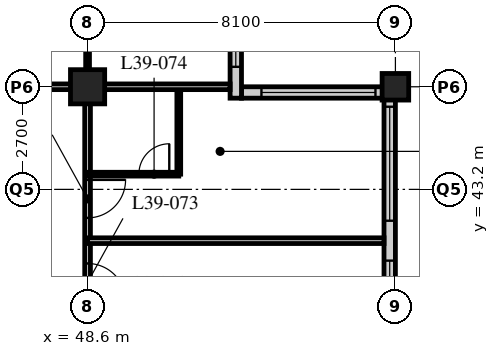
"""IFC4 building model, lengths in metres.
Left out: names, types, materials, properties, quantities, classifications, styles, units other than length and angle.
Written with IfcOpenShell. Run it as: python <this file> out.ifc"""

import sys

from ifc_helpers import new_model, si_unit, direction, frame, frame_2d, origin, origin_2d, place, context, subcontext, project, spatial, rectangle, hollow_rectangle, extrude, element, fill, save


model = new_model("IFC4")
c1 = context("Model", 3, precision=1e-05, world=origin(), true_north=direction((0.0, 1.0)))
c2 = subcontext(c1, "Body", "Model", "MODEL_VIEW")
j1 = project(units=[si_unit("LENGTHUNIT", "METRE"), si_unit("PLANEANGLEUNIT", "RADIAN")], contexts=[c1])
p1 = place(None, origin())
s1 = spatial("IfcSite", under=j1, at=p1, CompositionType="ELEMENT")
p2 = place(p1, origin())
s2 = spatial("IfcBuilding", under=s1, at=p2, CompositionType="ELEMENT")
p3 = place(p2, frame((0.0, 0.0, 151.0)))
s3 = spatial("IfcBuildingStorey", under=s2, at=p3, CompositionType="ELEMENT", Elevation=151.0)
p4 = place(p3, frame((48.6, 45.9, 0.0), z_axis=(0.0, 0.0, 1.0), x_axis=(1.0, 0.0, 0.0)))
e1 = element("IfcColumn", 1, at=p4, inside=s3, PredefinedType="COLUMN", context=c2, shape_type="SweptSolid", body=[
    extrude(hollow_rectangle(XDim=0.9, YDim=0.9, WallThickness=0.1, at=origin_2d()), origin(), (0.0, 0.0, 1.0), 3.4),
])
p5 = place(p3, frame((56.7, 45.9, 0.0), z_axis=(0.0, 0.0, 1.0), x_axis=(1.0, 0.0, 0.0)))
e2 = element("IfcColumn", 2, at=p5, inside=s3, PredefinedType="COLUMN", context=c2, shape_type="SweptSolid", body=[
    extrude(hollow_rectangle(XDim=0.7, YDim=0.7, WallThickness=0.07, at=origin_2d()), origin(), (0.0, 0.0, 1.0), 3.4),
])
p6 = place(p3, frame((56.55, 13.8, 0.0), z_axis=(0.0, 0.0, 1.0), x_axis=(0.0, 1.0, 0.0)))
e3 = element("IfcWall", 3, at=p6, inside=s3, PredefinedType="SOLIDWALL", context=c2, shape_type="SweptSolid", body=[
    extrude(rectangle(XDim=32.1, YDim=0.3, at=frame_2d((16.05, 0.0))), origin(), (0.0, 0.0, 1.0), 3.19),
])
p7 = place(p6, frame((0.225, 0.0, 0.9)))
e4 = element("IfcOpeningElement", 4, at=p7, cuts=e3, PredefinedType="OPENING", context=c2, shape_type="SweptSolid", body=[
    extrude(rectangle(XDim=3.0, YDim=1.4, at=frame_2d((1.5, 0.7))), frame((0.0, 0.16, 0.0), z_axis=(0.0, -1.0, 0.0), x_axis=(1.0, 0.0, 0.0)), (0.0, 0.0, 1.0), 0.32),
])
p8 = place(p6, frame((4.275, 0.0, 0.9)))
e5 = element("IfcOpeningElement", 5, at=p8, cuts=e3, PredefinedType="OPENING", context=c2, shape_type="SweptSolid", body=[
    extrude(rectangle(XDim=3.0, YDim=1.4, at=frame_2d((1.5, 0.7))), frame((0.0, 0.16, 0.0), z_axis=(0.0, -1.0, 0.0), x_axis=(1.0, 0.0, 0.0)), (0.0, 0.0, 1.0), 0.32),
])
p9 = place(p6, frame((8.325, 0.0, 0.9)))
e6 = element("IfcOpeningElement", 6, at=p9, cuts=e3, PredefinedType="OPENING", context=c2, shape_type="SweptSolid", body=[
    extrude(rectangle(XDim=3.0, YDim=1.4, at=frame_2d((1.5, 0.7))), frame((0.0, 0.16, 0.0), z_axis=(0.0, -1.0, 0.0), x_axis=(1.0, 0.0, 0.0)), (0.0, 0.0, 1.0), 0.32),
])
p10 = place(p6, frame((12.375, 0.0, 0.9)))
e7 = element("IfcOpeningElement", 7, at=p10, cuts=e3, PredefinedType="OPENING", context=c2, shape_type="SweptSolid", body=[
    extrude(rectangle(XDim=3.0, YDim=1.4, at=frame_2d((1.5, 0.7))), frame((0.0, 0.16, 0.0), z_axis=(0.0, -1.0, 0.0), x_axis=(1.0, 0.0, 0.0)), (0.0, 0.0, 1.0), 0.32),
])
p11 = place(p6, frame((16.425, 0.0, 0.9)))
e8 = element("IfcOpeningElement", 8, at=p11, cuts=e3, PredefinedType="OPENING", context=c2, shape_type="SweptSolid", body=[
    extrude(rectangle(XDim=3.0, YDim=1.4, at=frame_2d((1.5, 0.7))), frame((0.0, 0.16, 0.0), z_axis=(0.0, -1.0, 0.0), x_axis=(1.0, 0.0, 0.0)), (0.0, 0.0, 1.0), 0.32),
])
p12 = place(p6, frame((20.475, 0.0, 0.9)))
e9 = element("IfcOpeningElement", 9, at=p12, cuts=e3, PredefinedType="OPENING", context=c2, shape_type="SweptSolid", body=[
    extrude(rectangle(XDim=3.0, YDim=1.4, at=frame_2d((1.5, 0.7))), frame((0.0, 0.16, 0.0), z_axis=(0.0, -1.0, 0.0), x_axis=(1.0, 0.0, 0.0)), (0.0, 0.0, 1.0), 0.32),
])
p13 = place(p6, frame((24.525, 0.0, 0.9)))
e10 = element("IfcOpeningElement", 10, at=p13, cuts=e3, PredefinedType="OPENING", context=c2, shape_type="SweptSolid", body=[
    extrude(rectangle(XDim=3.0, YDim=1.4, at=frame_2d((1.5, 0.7))), frame((0.0, 0.16, 0.0), z_axis=(0.0, -1.0, 0.0), x_axis=(1.0, 0.0, 0.0)), (0.0, 0.0, 1.0), 0.32),
])
p14 = place(p6, frame((28.575, 0.0, 0.9)))
e11 = element("IfcOpeningElement", 11, at=p14, cuts=e3, PredefinedType="OPENING", context=c2, shape_type="SweptSolid", body=[
    extrude(rectangle(XDim=3.0, YDim=1.4, at=frame_2d((1.5, 0.7))), frame((0.0, 0.16, 0.0), z_axis=(0.0, -1.0, 0.0), x_axis=(1.0, 0.0, 0.0)), (0.0, 0.0, 1.0), 0.32),
])
p15 = place(p3, frame((56.4, 45.75, 0.0), z_axis=(0.0, 0.0, 1.0), x_axis=(-1.0, 0.0, 0.0)))
e12 = element("IfcWall", 12, at=p15, inside=s3, PredefinedType="SOLIDWALL", context=c2, shape_type="SweptSolid", body=[
    extrude(rectangle(XDim=3.75, YDim=0.3, at=frame_2d((1.875, 0.0))), origin(), (0.0, 0.0, 1.0), 3.19),
])
p16 = place(p15, frame((0.225, 0.0, 0.9)))
e13 = element("IfcOpeningElement", 13, at=p16, cuts=e12, PredefinedType="OPENING", context=c2, shape_type="SweptSolid", body=[
    extrude(rectangle(XDim=3.0, YDim=1.4, at=frame_2d((1.5, 0.7))), frame((0.0, 0.16, 0.0), z_axis=(0.0, -1.0, 0.0), x_axis=(1.0, 0.0, 0.0)), (0.0, 0.0, 1.0), 0.32),
])
p17 = place(p3, frame((52.5, 45.6, 0.0), z_axis=(0.0, 0.0, 1.0), x_axis=(0.0, 1.0, 0.0)))
e14 = element("IfcWall", 14, at=p17, inside=s3, PredefinedType="SOLIDWALL", context=c2, shape_type="SweptSolid", body=[
    extrude(rectangle(XDim=4.35, YDim=0.3, at=frame_2d((2.175, 0.0))), origin(), (0.0, 0.0, 1.0), 3.19),
])
p18 = place(p17, frame((0.825, 0.0, 0.9)))
e15 = element("IfcOpeningElement", 15, at=p18, cuts=e14, PredefinedType="OPENING", context=c2, shape_type="SweptSolid", body=[
    extrude(rectangle(XDim=3.0, YDim=1.4, at=frame_2d((1.5, 0.7))), frame((0.0, 0.16, 0.0), z_axis=(0.0, -1.0, 0.0), x_axis=(1.0, 0.0, 0.0)), (0.0, 0.0, 1.0), 0.32),
])
p19 = place(p3, frame((8.1, 45.9, 0.0), z_axis=(0.0, 0.0, 1.0), x_axis=(1.0, 0.0, 0.0)))
e16 = element("IfcWall", 16, at=p19, inside=s3, PredefinedType="PARTITIONING", context=c2, shape_type="SweptSolid", body=[
    extrude(rectangle(XDim=40.5, YDim=0.15, at=frame_2d((20.25, 0.0))), origin(), (0.0, 0.0, 1.0), 2.42),
])
p20 = place(p19, frame((9.625, 0.0, 0.0)))
e17 = element("IfcOpeningElement", 17, at=p20, cuts=e16, PredefinedType="OPENING", context=c2, shape_type="SweptSolid", body=[
    extrude(rectangle(XDim=1.0, YDim=2.1, at=frame_2d((0.5, 1.05))), frame((0.0, 0.085, 0.0), z_axis=(0.0, -1.0, 0.0), x_axis=(1.0, 0.0, 0.0)), (0.0, 0.0, 1.0), 0.17),
])
p21 = place(p19, frame((21.775, 0.0, 0.0)))
e18 = element("IfcOpeningElement", 18, at=p21, cuts=e16, PredefinedType="OPENING", context=c2, shape_type="SweptSolid", body=[
    extrude(rectangle(XDim=1.0, YDim=2.1, at=frame_2d((0.5, 1.05))), frame((0.0, 0.085, 0.0), z_axis=(0.0, -1.0, 0.0), x_axis=(1.0, 0.0, 0.0)), (0.0, 0.0, 1.0), 0.17),
])
p22 = place(p19, frame((28.95, 0.0, 0.0)))
e19 = element("IfcOpeningElement", 19, at=p22, cuts=e16, PredefinedType="OPENING", context=c2, shape_type="SweptSolid", body=[
    extrude(rectangle(XDim=1.0, YDim=2.1, at=frame_2d((0.5, 1.05))), frame((0.0, 0.085, 0.0), z_axis=(0.0, -1.0, 0.0), x_axis=(1.0, 0.0, 0.0)), (0.0, 0.0, 1.0), 0.17),
])
p23 = place(p19, frame((34.85, 0.0, 0.0)))
e20 = element("IfcOpeningElement", 20, at=p23, cuts=e16, PredefinedType="OPENING", context=c2, shape_type="SweptSolid", body=[
    extrude(rectangle(XDim=1.0, YDim=2.1, at=frame_2d((0.5, 1.05))), frame((0.0, 0.085, 0.0), z_axis=(0.0, -1.0, 0.0), x_axis=(1.0, 0.0, 0.0)), (0.0, 0.0, 1.0), 0.17),
])
p24 = place(p19, frame((36.875, 0.0, 0.0)))
e21 = element("IfcOpeningElement", 21, at=p24, cuts=e16, PredefinedType="OPENING", context=c2, shape_type="SweptSolid", body=[
    extrude(rectangle(XDim=1.0, YDim=2.1, at=frame_2d((0.5, 1.05))), frame((0.0, 0.085, 0.0), z_axis=(0.0, -1.0, 0.0), x_axis=(1.0, 0.0, 0.0)), (0.0, 0.0, 1.0), 0.17),
])
p25 = place(p19, frame((2.625, 0.0, 0.0)))
e22 = element("IfcOpeningElement", 22, at=p25, cuts=e16, PredefinedType="OPENING", context=c2, shape_type="SweptSolid", body=[
    extrude(rectangle(XDim=1.0, YDim=2.1, at=frame_2d((0.5, 1.05))), frame((0.0, 0.085, 0.0), z_axis=(0.0, -1.0, 0.0), x_axis=(1.0, 0.0, 0.0)), (0.0, 0.0, 1.0), 0.17),
])
p26 = place(p3, frame((48.6, 17.55, 0.0), z_axis=(0.0, 0.0, 1.0), x_axis=(0.0, 1.0, 0.0)))
e23 = element("IfcWall", 23, at=p26, inside=s3, PredefinedType="PARTITIONING", context=c2, shape_type="SweptSolid", body=[
    extrude(rectangle(XDim=28.35, YDim=0.15, at=frame_2d((14.175, 0.0))), origin(), (0.0, 0.0, 1.0), 2.42),
])
p27 = place(p26, frame((0.3, 0.0, 0.0)))
e24 = element("IfcOpeningElement", 24, at=p27, cuts=e23, PredefinedType="OPENING", context=c2, shape_type="SweptSolid", body=[
    extrude(rectangle(XDim=1.0, YDim=2.1, at=frame_2d((0.5, 1.05))), frame((0.0, 0.085, 0.0), z_axis=(0.0, -1.0, 0.0), x_axis=(1.0, 0.0, 0.0)), (0.0, 0.0, 1.0), 0.17),
])
p28 = place(p26, frame((6.5, 0.0, 0.0)))
e25 = element("IfcOpeningElement", 25, at=p28, cuts=e23, PredefinedType="OPENING", context=c2, shape_type="SweptSolid", body=[
    extrude(rectangle(XDim=1.0, YDim=2.1, at=frame_2d((0.5, 1.05))), frame((0.0, 0.085, 0.0), z_axis=(0.0, -1.0, 0.0), x_axis=(1.0, 0.0, 0.0)), (0.0, 0.0, 1.0), 0.17),
])
p29 = place(p26, frame((13.675, 0.0, 0.0)))
e26 = element("IfcOpeningElement", 26, at=p29, cuts=e23, PredefinedType="OPENING", context=c2, shape_type="SweptSolid", body=[
    extrude(rectangle(XDim=1.0, YDim=2.1, at=frame_2d((0.5, 1.05))), frame((0.0, 0.085, 0.0), z_axis=(0.0, -1.0, 0.0), x_axis=(1.0, 0.0, 0.0)), (0.0, 0.0, 1.0), 0.17),
])
p30 = place(p26, frame((22.7, 0.0, 0.0)))
e27 = element("IfcOpeningElement", 27, at=p30, cuts=e23, PredefinedType="OPENING", context=c2, shape_type="SweptSolid", body=[
    extrude(rectangle(XDim=1.0, YDim=2.1, at=frame_2d((0.5, 1.05))), frame((0.0, 0.085, 0.0), z_axis=(0.0, -1.0, 0.0), x_axis=(1.0, 0.0, 0.0)), (0.0, 0.0, 1.0), 0.17),
])
p31 = place(p26, frame((24.9, 0.0, 0.0)))
e28 = element("IfcOpeningElement", 28, at=p31, cuts=e23, PredefinedType="OPENING", context=c2, shape_type="SweptSolid", body=[
    extrude(rectangle(XDim=1.0, YDim=2.1, at=frame_2d((0.5, 1.05))), frame((0.0, 0.085, 0.0), z_axis=(0.0, -1.0, 0.0), x_axis=(1.0, 0.0, 0.0)), (0.0, 0.0, 1.0), 0.17),
])
p32 = place(p3, frame((48.6, 41.85, 0.0), z_axis=(0.0, 0.0, 1.0), x_axis=(1.0, 0.0, 0.0)))
e29 = element("IfcWall", 29, at=p32, inside=s3, PredefinedType="PARTITIONING", context=c2, shape_type="SweptSolid", body=[
    extrude(rectangle(XDim=7.8, YDim=0.15, at=frame_2d((3.9, 0.0))), origin(), (0.0, 0.0, 1.0), 3.19),
])
p33 = place(p3, frame((51.0, 43.6, 0.0), z_axis=(0.0, 0.0, 1.0), x_axis=(0.0, 1.0, 0.0)))
e30 = element("IfcWall", 30, at=p33, inside=s3, PredefinedType="PARTITIONING", context=c2, shape_type="SweptSolid", body=[
    extrude(rectangle(XDim=2.3, YDim=0.1, at=frame_2d((1.15, 0.0))), origin(), (0.0, 0.0, 1.0), 3.19),
])
p34 = place(p3, frame((48.6, 43.6, 0.0), z_axis=(0.0, 0.0, 1.0), x_axis=(1.0, 0.0, 0.0)))
e31 = element("IfcWall", 31, at=p34, inside=s3, PredefinedType="PARTITIONING", context=c2, shape_type="SweptSolid", body=[
    extrude(rectangle(XDim=2.4, YDim=0.1, at=frame_2d((1.2, 0.0))), origin(), (0.0, 0.0, 1.0), 3.19),
])
p35 = place(p34, frame((1.35, 0.0, 0.0)))
e32 = element("IfcOpeningElement", 32, at=p35, cuts=e31, PredefinedType="OPENING", context=c2, shape_type="SweptSolid", body=[
    extrude(rectangle(XDim=0.8, YDim=2.1, at=frame_2d((0.4, 1.05))), frame((0.0, 0.06, 0.0), z_axis=(0.0, -1.0, 0.0), x_axis=(1.0, 0.0, 0.0)), (0.0, 0.0, 1.0), 0.12),
])
p36 = place(p3, frame((48.6, 45.9, 0.0), z_axis=(0.0, 0.0, 1.0), x_axis=(0.0, 1.0, 0.0)))
e33 = element("IfcWall", 33, at=p36, inside=s3, PredefinedType="PARTITIONING", context=c2, shape_type="SweptSolid", body=[
    extrude(rectangle(XDim=2.4, YDim=0.1, at=frame_2d((1.2, 0.0))), origin(), (0.0, 0.0, 1.0), 2.42),
])
p37 = place(p3, frame((48.6, 45.9, 0.0), z_axis=(0.0, 0.0, 1.0), x_axis=(1.0, 0.0, 0.0)))
e34 = element("IfcWall", 34, at=p37, inside=s3, PredefinedType="PARTITIONING", context=c2, shape_type="SweptSolid", body=[
    extrude(rectangle(XDim=3.75, YDim=0.15, at=frame_2d((1.875, 0.0))), origin(), (0.0, 0.0, 1.0), 2.42),
])
p38 = place(p13, origin())
e35 = element("IfcWindow", 35, at=p38, inside=s3, PartitioningType="SINGLE_PANEL", PredefinedType="WINDOW", context=c2, shape_type="SweptSolid", body=[
    extrude(rectangle(XDim=3.0, YDim=1.4, at=frame_2d((1.5, 0.7))), frame((0.0, 0.03, 0.0), z_axis=(0.0, -1.0, 0.0), x_axis=(1.0, 0.0, 0.0)), (0.0, 0.0, 1.0), 0.06),
])
fill(e10, e35)
p39 = place(p14, origin())
e36 = element("IfcWindow", 36, at=p39, inside=s3, PartitioningType="SINGLE_PANEL", PredefinedType="WINDOW", context=c2, shape_type="SweptSolid", body=[
    extrude(rectangle(XDim=3.0, YDim=1.4, at=frame_2d((1.5, 0.7))), frame((0.0, 0.03, 0.0), z_axis=(0.0, -1.0, 0.0), x_axis=(1.0, 0.0, 0.0)), (0.0, 0.0, 1.0), 0.06),
])
fill(e11, e36)
p40 = place(p16, origin())
e37 = element("IfcWindow", 37, at=p40, inside=s3, PartitioningType="SINGLE_PANEL", PredefinedType="WINDOW", context=c2, shape_type="SweptSolid", body=[
    extrude(rectangle(XDim=3.0, YDim=1.4, at=frame_2d((1.5, 0.7))), frame((0.0, 0.03, 0.0), z_axis=(0.0, -1.0, 0.0), x_axis=(1.0, 0.0, 0.0)), (0.0, 0.0, 1.0), 0.06),
])
fill(e13, e37)
p41 = place(p18, origin())
e38 = element("IfcWindow", 38, at=p41, inside=s3, PartitioningType="SINGLE_PANEL", PredefinedType="WINDOW", context=c2, shape_type="SweptSolid", body=[
    extrude(rectangle(XDim=3.0, YDim=1.4, at=frame_2d((1.5, 0.7))), frame((0.0, 0.03, 0.0), z_axis=(0.0, -1.0, 0.0), x_axis=(1.0, 0.0, 0.0)), (0.0, 0.0, 1.0), 0.06),
])
fill(e15, e38)
p42 = place(p30, origin())
e39 = element("IfcDoor", 39, at=p42, inside=s3, OperationType="SINGLE_SWING_RIGHT", PredefinedType="DOOR", context=c2, shape_type="SweptSolid", body=[
    extrude(rectangle(XDim=1.0, YDim=2.1, at=frame_2d((0.5, 1.05))), frame((0.0, 0.025, 0.0), z_axis=(0.0, -1.0, 0.0), x_axis=(1.0, 0.0, 0.0)), (0.0, 0.0, 1.0), 0.05),
])
fill(e27, e39)
p43 = place(p35, origin())
e40 = element("IfcDoor", 40, at=p43, inside=s3, OperationType="SINGLE_SWING_RIGHT", PredefinedType="DOOR", context=c2, shape_type="SweptSolid", body=[
    extrude(rectangle(XDim=0.8, YDim=2.1, at=frame_2d((0.4, 1.05))), frame((0.0, 0.025, 0.0), z_axis=(0.0, -1.0, 0.0), x_axis=(1.0, 0.0, 0.0)), (0.0, 0.0, 1.0), 0.05),
])
fill(e32, e40)
p44 = place(p31, origin())
e41 = element("IfcDoor", 41, at=p44, inside=s3, OperationType="SINGLE_SWING_LEFT", PredefinedType="DOOR", context=c2, shape_type="SweptSolid", body=[
    extrude(rectangle(XDim=1.0, YDim=2.1, at=frame_2d((0.5, 1.05))), frame((0.0, 0.025, 0.0), z_axis=(0.0, -1.0, 0.0), x_axis=(1.0, 0.0, 0.0)), (0.0, 0.0, 1.0), 0.05),
])
fill(e28, e41)
save(model, sys.argv[1])
